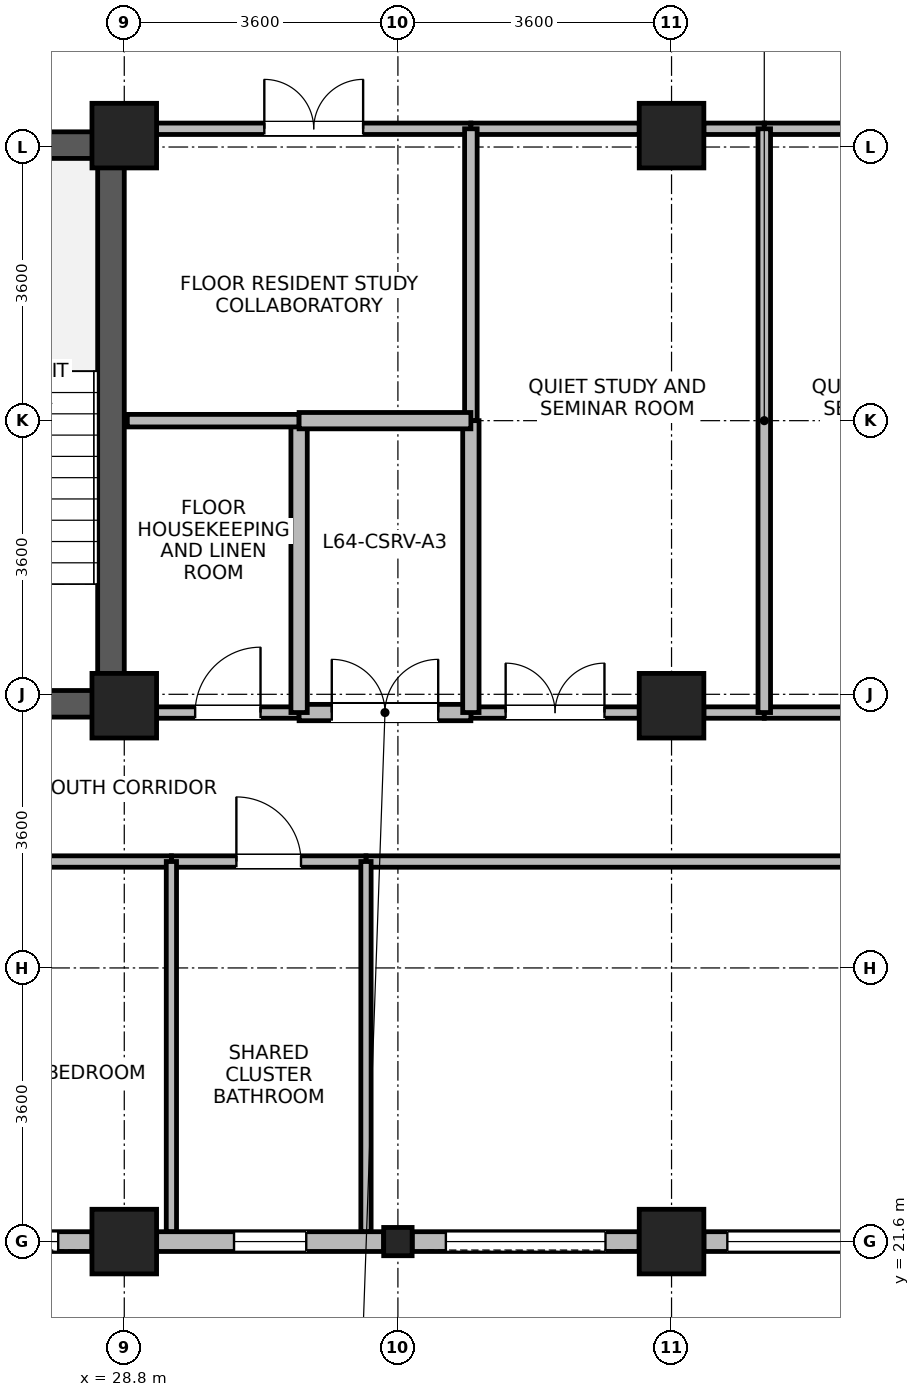
"""IFC4 building model, lengths in metres.
Left out: names, types, materials, properties, quantities, classifications, styles, units other than length and angle.
Written with IfcOpenShell. Run it as: python <this file> out.ifc"""

import sys

from ifc_helpers import new_model, si_unit, direction, frame, frame_2d, origin, origin_2d, place, context, subcontext, project, spatial, rectangle, i_section, extrude, source, transform, mapped, element, fill, save


model = new_model("IFC4")
c1 = context("Model", 3, precision=1e-05, world=origin(), true_north=direction((0.0, 1.0)))
c2 = subcontext(c1, "Body", "Model", "MODEL_VIEW")
j1 = project(units=[si_unit("LENGTHUNIT", "METRE"), si_unit("PLANEANGLEUNIT", "RADIAN")], contexts=[c1])
p1 = place(None, origin())
s1 = spatial("IfcSite", under=j1, at=p1, CompositionType="ELEMENT")
p2 = place(p1, origin())
s2 = spatial("IfcBuilding", under=s1, at=p2, CompositionType="ELEMENT")
p3 = place(p2, frame((0.0, 0.0, 249.9)))
s3 = spatial("IfcBuildingStorey", under=s2, at=p3, CompositionType="ELEMENT", Elevation=249.9)
p4 = place(p3, frame((28.625, 28.5, 0.0), z_axis=(0.0, 0.0, 1.0), x_axis=(0.0, 1.0, 0.0)))
e1 = element("IfcWall", 1, at=p4, inside=s3, PredefinedType="SHEAR", context=c2, shape_type="SweptSolid", body=[
    extrude(rectangle(XDim=7.7, YDim=0.35, at=frame_2d((3.85, 0.0))), origin(), (0.0, 0.0, 1.0), 3.475),
])
for number, where, z_axis, x_axis in (
    (2, (25.25, 28.675, 0.0), (0.0, 0.0, 1.0), (1.0, 0.0, 0.0)),
    (3, (25.25, 36.025, 0.0), (0.0, 0.0, 1.0), (1.0, 0.0, 0.0)),
):
    element("IfcWall", number, at=place(p3, frame(where, z_axis=z_axis, x_axis=x_axis)), inside=s3, PredefinedType="SHEAR", context=c2, shape_type="SweptSolid", body=[
        extrude(rectangle(XDim=3.2, YDim=0.35, at=frame_2d((1.6, 0.0))), origin(), (0.0, 0.0, 1.0), 3.475),
    ])
m1 = source(origin(), c2, "Body", "SweptSolid", [
    extrude(rectangle(XDim=0.85, YDim=0.85, at=origin_2d()), origin(), (0.0, 0.0, 1.0), 3.7),
])
for number, where, z_axis, x_axis in (
    (4, (28.8, 21.6, 0.0), (0.0, 0.0, 1.0), (1.0, 0.0, 0.0)),
    (5, (28.8, 28.65, 0.0), (0.0, 0.0, 1.0), (1.0, 0.0, 0.0)),
    (6, (28.8, 36.15, 0.0), (0.0, 0.0, 1.0), (1.0, 0.0, 0.0)),
    (7, (36.0, 21.6, 0.0), (0.0, 0.0, 1.0), (1.0, 0.0, 0.0)),
    (8, (36.0, 28.65, 0.0), (0.0, 0.0, 1.0), (1.0, 0.0, 0.0)),
    (9, (36.0, 36.15, 0.0), (0.0, 0.0, 1.0), (1.0, 0.0, 0.0)),
):
    element("IfcColumn", number, at=place(p3, frame(where, z_axis=z_axis, x_axis=x_axis)), inside=s3, PredefinedType="COLUMN", context=c2, shape_type="MappedRepresentation", body=[
        mapped(m1, transform((0.0, 0.0, 0.0), x_axis=(1.0, 0.0, 0.0), y_axis=(0.0, 1.0, 0.0), z_axis=(0.0, 0.0, 1.0), scale=1.0)),
    ])
m2 = source(origin(), c2, "Body", "SweptSolid", [
    extrude(i_section(OverallWidth=0.374, OverallDepth=0.372, WebThickness=0.015, FlangeThickness=0.026, FilletRadius=0.015, at=origin_2d()), origin(), (0.0, 0.0, 1.0), 3.7),
])
p5 = place(p3, frame((32.4, 21.6, 0.0), z_axis=(0.0, 0.0, 1.0), x_axis=(1.0, 0.0, 0.0)))
e10 = element("IfcColumn", 10, at=p5, inside=s3, PredefinedType="COLUMN", context=c2, shape_type="MappedRepresentation", body=[
    mapped(m2, transform((0.0, 0.0, 0.0), x_axis=(1.0, 0.0, 0.0), y_axis=(0.0, 1.0, 0.0), z_axis=(0.0, 0.0, 1.0), scale=1.0)),
])
p6 = place(p3, frame((28.374, 21.6, 0.0), z_axis=(0.0, 0.0, 1.0), x_axis=(-1.0, 0.0, 0.0)))
e11 = element("IfcWall", 11, at=p6, inside=s3, PredefinedType="STANDARD", context=c2, shape_type="SweptSolid", body=[
    extrude(rectangle(XDim=2.986, YDim=0.26, at=frame_2d((1.493, 0.0))), origin(), (0.0, 0.0, 1.0), 3.055),
])
p7 = place(p6, frame((0.443, 0.0, 0.85)))
e12 = element("IfcOpeningElement", 12, at=p7, cuts=e11, PredefinedType="OPENING", context=c2, shape_type="SweptSolid", body=[
    extrude(rectangle(XDim=2.1, YDim=1.95, at=frame_2d((1.05, 0.975))), frame((0.0, 0.14, 0.0), z_axis=(0.0, -1.0, 0.0), x_axis=(1.0, 0.0, 0.0)), (0.0, 0.0, 1.0), 0.28),
])
p8 = place(p3, frame((32.212, 21.6, 0.0), z_axis=(0.0, 0.0, 1.0), x_axis=(-1.0, 0.0, 0.0)))
e13 = element("IfcWall", 13, at=p8, inside=s3, PredefinedType="STANDARD", context=c2, shape_type="SweptSolid", body=[
    extrude(rectangle(XDim=2.986, YDim=0.26, at=frame_2d((1.493, 0.0))), origin(), (0.0, 0.0, 1.0), 3.055),
])
p9 = place(p8, frame((1.018, 0.0, 0.85)))
e14 = element("IfcOpeningElement", 14, at=p9, cuts=e13, PredefinedType="OPENING", context=c2, shape_type="SweptSolid", body=[
    extrude(rectangle(XDim=0.95, YDim=1.75, at=frame_2d((0.475, 0.875))), frame((0.0, 0.14, 0.0), z_axis=(0.0, -1.0, 0.0), x_axis=(1.0, 0.0, 0.0)), (0.0, 0.0, 1.0), 0.28),
])
p10 = place(p3, frame((35.574, 21.6, 0.0), z_axis=(0.0, 0.0, 1.0), x_axis=(-1.0, 0.0, 0.0)))
e15 = element("IfcWall", 15, at=p10, inside=s3, PredefinedType="STANDARD", context=c2, shape_type="SweptSolid", body=[
    extrude(rectangle(XDim=2.986, YDim=0.26, at=frame_2d((1.493, 0.0))), origin(), (0.0, 0.0, 1.0), 3.055),
])
p11 = place(p10, frame((0.443, 0.0, 0.85)))
e16 = element("IfcOpeningElement", 16, at=p11, cuts=e15, PredefinedType="OPENING", context=c2, shape_type="SweptSolid", body=[
    extrude(rectangle(XDim=2.1, YDim=1.95, at=frame_2d((1.05, 0.975))), frame((0.0, 0.14, 0.0), z_axis=(0.0, -1.0, 0.0), x_axis=(1.0, 0.0, 0.0)), (0.0, 0.0, 1.0), 0.28),
])
p12 = place(p3, frame((46.374, 21.6, 0.0), z_axis=(0.0, 0.0, 1.0), x_axis=(-1.0, 0.0, 0.0)))
e17 = element("IfcWall", 17, at=p12, inside=s3, PredefinedType="STANDARD", context=c2, shape_type="SweptSolid", body=[
    extrude(rectangle(XDim=9.948, YDim=0.26, at=frame_2d((4.974, 0.0))), origin(), (0.0, 0.0, 1.0), 3.055),
])
p13 = place(p12, frame((0.308, 0.0, 0.85)))
e18 = element("IfcOpeningElement", 18, at=p13, cuts=e17, PredefinedType="OPENING", context=c2, shape_type="SweptSolid", body=[
    extrude(rectangle(XDim=2.7, YDim=2.05, at=frame_2d((1.35, 1.025))), frame((0.0, 0.14, 0.0), z_axis=(0.0, -1.0, 0.0), x_axis=(1.0, 0.0, 0.0)), (0.0, 0.0, 1.0), 0.28),
])
p14 = place(p12, frame((3.624, 0.0, 0.85)))
e19 = element("IfcOpeningElement", 19, at=p14, cuts=e17, PredefinedType="OPENING", context=c2, shape_type="SweptSolid", body=[
    extrude(rectangle(XDim=2.7, YDim=2.05, at=frame_2d((1.35, 1.025))), frame((0.0, 0.14, 0.0), z_axis=(0.0, -1.0, 0.0), x_axis=(1.0, 0.0, 0.0)), (0.0, 0.0, 1.0), 0.28),
])
p15 = place(p12, frame((6.94, 0.0, 0.85)))
e20 = element("IfcOpeningElement", 20, at=p15, cuts=e17, PredefinedType="OPENING", context=c2, shape_type="SweptSolid", body=[
    extrude(rectangle(XDim=2.7, YDim=2.05, at=frame_2d((1.35, 1.025))), frame((0.0, 0.14, 0.0), z_axis=(0.0, -1.0, 0.0), x_axis=(1.0, 0.0, 0.0)), (0.0, 0.0, 1.0), 0.28),
])
p16 = place(p3, frame((31.98, 26.6, 0.0), z_axis=(0.0, 0.0, 1.0), x_axis=(1.0, 0.0, 0.0)))
e21 = element("IfcWall", 21, at=p16, inside=s3, PredefinedType="PARTITIONING", context=c2, shape_type="SweptSolid", body=[
    extrude(rectangle(XDim=14.688, YDim=0.15, at=frame_2d((7.344, 0.0))), origin(), (0.0, 0.0, 1.0), 3.455),
])
p17 = place(p16, frame((6.694, 0.0, 0.0)))
e22 = element("IfcOpeningElement", 22, at=p17, cuts=e21, PredefinedType="OPENING", context=c2, shape_type="SweptSolid", body=[
    extrude(rectangle(XDim=1.3, YDim=2.12, at=frame_2d((0.65, 1.06))), frame((0.0, 0.085, 0.0), z_axis=(0.0, -1.0, 0.0), x_axis=(1.0, 0.0, 0.0)), (0.0, 0.0, 1.0), 0.17),
])
p18 = place(p3, frame((22.7, 26.6, 0.0), z_axis=(0.0, 0.0, 1.0), x_axis=(1.0, 0.0, 0.0)))
e23 = element("IfcWall", 23, at=p18, inside=s3, PredefinedType="PARTITIONING", context=c2, shape_type="SweptSolid", body=[
    extrude(rectangle(XDim=6.72, YDim=0.15, at=frame_2d((3.36, 0.0))), origin(), (0.0, 0.0, 1.0), 3.455),
])
p19 = place(p18, frame((2.885, 0.0, 0.0)))
e24 = element("IfcOpeningElement", 24, at=p19, cuts=e23, PredefinedType="OPENING", context=c2, shape_type="SweptSolid", body=[
    extrude(rectangle(XDim=0.95, YDim=2.1, at=frame_2d((0.475, 1.05))), frame((0.0, 0.085, 0.0), z_axis=(0.0, -1.0, 0.0), x_axis=(1.0, 0.0, 0.0)), (0.0, 0.0, 1.0), 0.17),
])
p20 = place(p3, frame((29.225, 36.24, 0.0), z_axis=(0.0, 0.0, 1.0), x_axis=(1.0, 0.0, 0.0)))
e25 = element("IfcWall", 25, at=p20, inside=s3, PredefinedType="PARTITIONING", context=c2, shape_type="SweptSolid", body=[
    extrude(rectangle(XDim=4.135, YDim=0.15, at=frame_2d((2.067, 0.0))), origin(), (0.0, 0.0, 1.0), 2.905),
])
p21 = place(p20, frame((1.417, 0.0, 0.0)))
e26 = element("IfcOpeningElement", 26, at=p21, cuts=e25, PredefinedType="OPENING", context=c2, shape_type="SweptSolid", body=[
    extrude(rectangle(XDim=1.3, YDim=2.12, at=frame_2d((0.65, 1.06))), frame((0.0, 0.085, 0.0), z_axis=(0.0, -1.0, 0.0), x_axis=(1.0, 0.0, 0.0)), (0.0, 0.0, 1.0), 0.17),
])
p22 = place(p3, frame((33.36, 28.56, 0.0), z_axis=(0.0, 0.0, 1.0), x_axis=(1.0, 0.0, 0.0)))
e27 = element("IfcWall", 27, at=p22, inside=s3, PredefinedType="PARTITIONING", context=c2, shape_type="SweptSolid", body=[
    extrude(rectangle(XDim=2.215, YDim=0.15, at=frame_2d((1.107, 0.0))), origin(), (0.0, 0.0, 1.0), 2.905),
])
p23 = place(p22, frame((0.458, 0.0, 0.0)))
e28 = element("IfcOpeningElement", 28, at=p23, cuts=e27, PredefinedType="OPENING", context=c2, shape_type="SweptSolid", body=[
    extrude(rectangle(XDim=1.3, YDim=2.12, at=frame_2d((0.65, 1.06))), frame((0.0, 0.085, 0.0), z_axis=(0.0, -1.0, 0.0), x_axis=(1.0, 0.0, 0.0)), (0.0, 0.0, 1.0), 0.17),
])
p24 = place(p3, frame((36.425, 28.56, 0.0), z_axis=(0.0, 0.0, 1.0), x_axis=(1.0, 0.0, 0.0)))
e29 = element("IfcWall", 29, at=p24, inside=s3, PredefinedType="PARTITIONING", context=c2, shape_type="SweptSolid", body=[
    extrude(rectangle(XDim=0.795, YDim=0.15, at=frame_2d((0.397, 0.0))), origin(), (0.0, 0.0, 1.0), 2.905),
])
p25 = place(p3, frame((33.36, 36.24, 0.0), z_axis=(0.0, 0.0, 1.0), x_axis=(1.0, 0.0, 0.0)))
e30 = element("IfcWall", 30, at=p25, inside=s3, PredefinedType="PARTITIONING", context=c2, shape_type="SweptSolid", body=[
    extrude(rectangle(XDim=2.215, YDim=0.15, at=frame_2d((1.107, 0.0))), origin(), (0.0, 0.0, 1.0), 2.905),
])
p26 = place(p3, frame((36.425, 36.24, 0.0), z_axis=(0.0, 0.0, 1.0), x_axis=(1.0, 0.0, 0.0)))
e31 = element("IfcWall", 31, at=p26, inside=s3, PredefinedType="PARTITIONING", context=c2, shape_type="SweptSolid", body=[
    extrude(rectangle(XDim=0.795, YDim=0.15, at=frame_2d((0.397, 0.0))), origin(), (0.0, 0.0, 1.0), 2.905),
])
p27 = place(p3, frame((37.22, 28.56, 0.0), z_axis=(0.0, 0.0, 1.0), x_axis=(1.0, 0.0, 0.0)))
e32 = element("IfcWall", 32, at=p27, inside=s3, PredefinedType="PARTITIONING", context=c2, shape_type="SweptSolid", body=[
    extrude(rectangle(XDim=3.58, YDim=0.15, at=frame_2d((1.79, 0.0))), origin(), (0.0, 0.0, 1.0), 2.905),
])
p28 = place(p27, frame((1.14, 0.0, 0.0)))
e33 = element("IfcOpeningElement", 33, at=p28, cuts=e32, PredefinedType="OPENING", context=c2, shape_type="SweptSolid", body=[
    extrude(rectangle(XDim=1.3, YDim=2.12, at=frame_2d((0.65, 1.06))), frame((0.0, 0.085, 0.0), z_axis=(0.0, -1.0, 0.0), x_axis=(1.0, 0.0, 0.0)), (0.0, 0.0, 1.0), 0.17),
])
p29 = place(p3, frame((37.22, 36.24, 0.0), z_axis=(0.0, 0.0, 1.0), x_axis=(1.0, 0.0, 0.0)))
e34 = element("IfcWall", 34, at=p29, inside=s3, PredefinedType="PARTITIONING", context=c2, shape_type="SweptSolid", body=[
    extrude(rectangle(XDim=3.58, YDim=0.15, at=frame_2d((1.79, 0.0))), origin(), (0.0, 0.0, 1.0), 2.905),
])
p30 = place(p3, frame((29.42, 26.6, 0.0), z_axis=(0.0, 0.0, 1.0), x_axis=(1.0, 0.0, 0.0)))
e35 = element("IfcWall", 35, at=p30, inside=s3, PredefinedType="PARTITIONING", context=c2, shape_type="SweptSolid", body=[
    extrude(rectangle(XDim=2.56, YDim=0.15, at=frame_2d((1.28, 0.0))), origin(), (0.0, 0.0, 1.0), 3.455),
])
p31 = place(p30, frame((0.855, 0.0, 0.0)))
e36 = element("IfcOpeningElement", 36, at=p31, cuts=e35, PredefinedType="OPENING", context=c2, shape_type="SweptSolid", body=[
    extrude(rectangle(XDim=0.85, YDim=2.04, at=frame_2d((0.425, 1.02))), frame((0.0, 0.085, 0.0), z_axis=(0.0, -1.0, 0.0), x_axis=(1.0, 0.0, 0.0)), (0.0, 0.0, 1.0), 0.17),
])
p32 = place(p3, frame((29.225, 28.56, 0.0), z_axis=(0.0, 0.0, 1.0), x_axis=(1.0, 0.0, 0.0)))
e37 = element("IfcWall", 37, at=p32, inside=s3, PredefinedType="PARTITIONING", context=c2, shape_type="SweptSolid", body=[
    extrude(rectangle(XDim=1.875, YDim=0.15, at=frame_2d((0.938, 0.0))), origin(), (0.0, 0.0, 1.0), 2.905),
])
p33 = place(p32, frame((0.508, 0.0, 0.0)))
e38 = element("IfcOpeningElement", 38, at=p33, cuts=e37, PredefinedType="OPENING", context=c2, shape_type="SweptSolid", body=[
    extrude(rectangle(XDim=0.86, YDim=2.02, at=frame_2d((0.43, 1.01))), frame((0.0, 0.085, 0.0), z_axis=(0.0, -1.0, 0.0), x_axis=(1.0, 0.0, 0.0)), (0.0, 0.0, 1.0), 0.17),
])
p34 = place(p3, frame((31.1, 28.56, 0.0), z_axis=(0.0, 0.0, 1.0), x_axis=(1.0, 0.0, 0.0)))
e39 = element("IfcWall", 39, at=p34, inside=s3, PredefinedType="PARTITIONING", context=c2, shape_type="SweptSolid", body=[
    extrude(rectangle(XDim=2.26, YDim=0.215, at=frame_2d((1.13, 0.0))), origin(), (0.0, 0.0, 1.0), 2.905),
])
p35 = place(p34, frame((0.43, 0.0, 0.0)))
e40 = element("IfcOpeningElement", 40, at=p35, cuts=e39, PredefinedType="OPENING", context=c2, shape_type="SweptSolid", body=[
    extrude(rectangle(XDim=1.4, YDim=2.15, at=frame_2d((0.7, 1.075))), frame((0.0, 0.118, 0.0), z_axis=(0.0, -1.0, 0.0), x_axis=(1.0, 0.0, 0.0)), (0.0, 0.0, 1.0), 0.235),
])
p36 = place(p3, frame((37.22, 28.56, 0.0), z_axis=(0.0, 0.0, 1.0), x_axis=(0.0, 1.0, 0.0)))
e41 = element("IfcWall", 41, at=p36, inside=s3, PredefinedType="PARTITIONING", context=c2, shape_type="SweptSolid", body=[
    extrude(rectangle(XDim=7.68, YDim=0.165, at=frame_2d((3.84, 0.0))), origin(), (0.0, 0.0, 1.0), 3.455),
])
for number, where, z_axis, x_axis in (
    (42, (29.42, 21.732, 0.0), (0.0, 0.0, 1.0), (0.0, 1.0, 0.0)),
    (43, (31.98, 21.732, 0.0), (0.0, 0.0, 1.0), (0.0, 1.0, 0.0)),
):
    element("IfcWall", number, at=place(p3, frame(where, z_axis=z_axis, x_axis=x_axis)), inside=s3, PredefinedType="PARTITIONING", context=c2, shape_type="SweptSolid", body=[
        extrude(rectangle(XDim=4.868, YDim=0.135, at=frame_2d((2.434, 0.0))), origin(), (0.0, 0.0, 1.0), 3.455),
    ])
p37 = place(p3, frame((33.36, 32.4, 0.0), z_axis=(0.0, 0.0, 1.0), x_axis=(0.0, 1.0, 0.0)))
e44 = element("IfcWall", 44, at=p37, inside=s3, PredefinedType="PARTITIONING", context=c2, shape_type="SweptSolid", body=[
    extrude(rectangle(XDim=3.84, YDim=0.165, at=frame_2d((1.92, 0.0))), origin(), (0.0, 0.0, 1.0), 3.455),
])
for number, where, z_axis, x_axis in (
    (45, (31.1, 28.56, 0.0), (0.0, 0.0, 1.0), (0.0, 1.0, 0.0)),
    (46, (33.36, 28.56, 0.0), (0.0, 0.0, 1.0), (0.0, 1.0, 0.0)),
):
    element("IfcWall", number, at=place(p3, frame(where, z_axis=z_axis, x_axis=x_axis)), inside=s3, PredefinedType="PARTITIONING", context=c2, shape_type="SweptSolid", body=[
        extrude(rectangle(XDim=3.84, YDim=0.215, at=frame_2d((1.92, 0.0))), origin(), (0.0, 0.0, 1.0), 3.455),
    ])
p38 = place(p3, frame((28.84, 32.4, 0.0), z_axis=(0.0, 0.0, 1.0), x_axis=(1.0, 0.0, 0.0)))
e47 = element("IfcWall", 47, at=p38, inside=s3, PredefinedType="PARTITIONING", context=c2, shape_type="SweptSolid", body=[
    extrude(rectangle(XDim=2.26, YDim=0.165, at=frame_2d((1.13, 0.0))), origin(), (0.0, 0.0, 1.0), 3.455),
])
p39 = place(p3, frame((31.1, 32.4, 0.0), z_axis=(0.0, 0.0, 1.0), x_axis=(1.0, 0.0, 0.0)))
e48 = element("IfcWall", 48, at=p39, inside=s3, PredefinedType="PARTITIONING", context=c2, shape_type="SweptSolid", body=[
    extrude(rectangle(XDim=2.26, YDim=0.215, at=frame_2d((1.13, 0.0))), origin(), (0.0, 0.0, 1.0), 3.455),
])
p40 = place(p7, origin())
e49 = element("IfcWindow", 49, at=p40, inside=s3, PartitioningType="SINGLE_PANEL", PredefinedType="WINDOW", context=c2, shape_type="SweptSolid", body=[
    extrude(rectangle(XDim=2.1, YDim=1.95, at=frame_2d((1.05, 0.975))), frame((0.0, 0.03, 0.0), z_axis=(0.0, -1.0, 0.0), x_axis=(1.0, 0.0, 0.0)), (0.0, 0.0, 1.0), 0.06),
])
fill(e12, e49)
p41 = place(p9, origin())
e50 = element("IfcWindow", 50, at=p41, inside=s3, PartitioningType="SINGLE_PANEL", PredefinedType="WINDOW", context=c2, shape_type="SweptSolid", body=[
    extrude(rectangle(XDim=0.95, YDim=1.75, at=frame_2d((0.475, 0.875))), frame((0.0, 0.03, 0.0), z_axis=(0.0, -1.0, 0.0), x_axis=(1.0, 0.0, 0.0)), (0.0, 0.0, 1.0), 0.06),
])
fill(e14, e50)
p42 = place(p11, origin())
e51 = element("IfcWindow", 51, at=p42, inside=s3, PartitioningType="SINGLE_PANEL", PredefinedType="WINDOW", context=c2, shape_type="SweptSolid", body=[
    extrude(rectangle(XDim=2.1, YDim=1.95, at=frame_2d((1.05, 0.975))), frame((0.0, 0.03, 0.0), z_axis=(0.0, -1.0, 0.0), x_axis=(1.0, 0.0, 0.0)), (0.0, 0.0, 1.0), 0.06),
])
fill(e16, e51)
p43 = place(p15, origin())
e52 = element("IfcWindow", 52, at=p43, inside=s3, PartitioningType="SINGLE_PANEL", PredefinedType="WINDOW", context=c2, shape_type="SweptSolid", body=[
    extrude(rectangle(XDim=2.7, YDim=2.05, at=frame_2d((1.35, 1.025))), frame((0.0, 0.03, 0.0), z_axis=(0.0, -1.0, 0.0), x_axis=(1.0, 0.0, 0.0)), (0.0, 0.0, 1.0), 0.06),
])
fill(e20, e52)
p44 = place(p21, origin())
e53 = element("IfcDoor", 53, at=p44, inside=s3, OperationType="DOUBLE_DOOR_SINGLE_SWING", PredefinedType="DOOR", context=c2, shape_type="SweptSolid", body=[
    extrude(rectangle(XDim=1.3, YDim=2.12, at=frame_2d((0.65, 1.06))), frame((0.0, 0.025, 0.0), z_axis=(0.0, -1.0, 0.0), x_axis=(1.0, 0.0, 0.0)), (0.0, 0.0, 1.0), 0.05),
])
fill(e26, e53)
p45 = place(p23, origin())
e54 = element("IfcDoor", 54, at=p45, inside=s3, OperationType="DOUBLE_DOOR_SINGLE_SWING", PredefinedType="DOOR", context=c2, shape_type="SweptSolid", body=[
    extrude(rectangle(XDim=1.3, YDim=2.12, at=frame_2d((0.65, 1.06))), frame((0.0, 0.025, 0.0), z_axis=(0.0, -1.0, 0.0), x_axis=(1.0, 0.0, 0.0)), (0.0, 0.0, 1.0), 0.05),
])
fill(e28, e54)
p46 = place(p31, origin())
e55 = element("IfcDoor", 55, at=p46, inside=s3, OperationType="SINGLE_SWING_LEFT", PredefinedType="DOOR", context=c2, shape_type="SweptSolid", body=[
    extrude(rectangle(XDim=0.85, YDim=2.04, at=frame_2d((0.425, 1.02))), frame((0.0, 0.025, 0.0), z_axis=(0.0, -1.0, 0.0), x_axis=(1.0, 0.0, 0.0)), (0.0, 0.0, 1.0), 0.05),
])
fill(e36, e55)
p47 = place(p33, origin())
e56 = element("IfcDoor", 56, at=p47, inside=s3, OperationType="SINGLE_SWING_RIGHT", PredefinedType="DOOR", context=c2, shape_type="SweptSolid", body=[
    extrude(rectangle(XDim=0.86, YDim=2.02, at=frame_2d((0.43, 1.01))), frame((0.0, 0.025, 0.0), z_axis=(0.0, -1.0, 0.0), x_axis=(1.0, 0.0, 0.0)), (0.0, 0.0, 1.0), 0.05),
])
fill(e38, e56)
p48 = place(p35, origin())
e57 = element("IfcDoor", 57, at=p48, inside=s3, OperationType="DOUBLE_DOOR_SINGLE_SWING", PredefinedType="DOOR", context=c2, shape_type="SweptSolid", body=[
    extrude(rectangle(XDim=1.4, YDim=2.15, at=frame_2d((0.7, 1.075))), frame((0.0, 0.025, 0.0), z_axis=(0.0, -1.0, 0.0), x_axis=(1.0, 0.0, 0.0)), (0.0, 0.0, 1.0), 0.05),
])
fill(e40, e57)
save(model, sys.argv[1])
